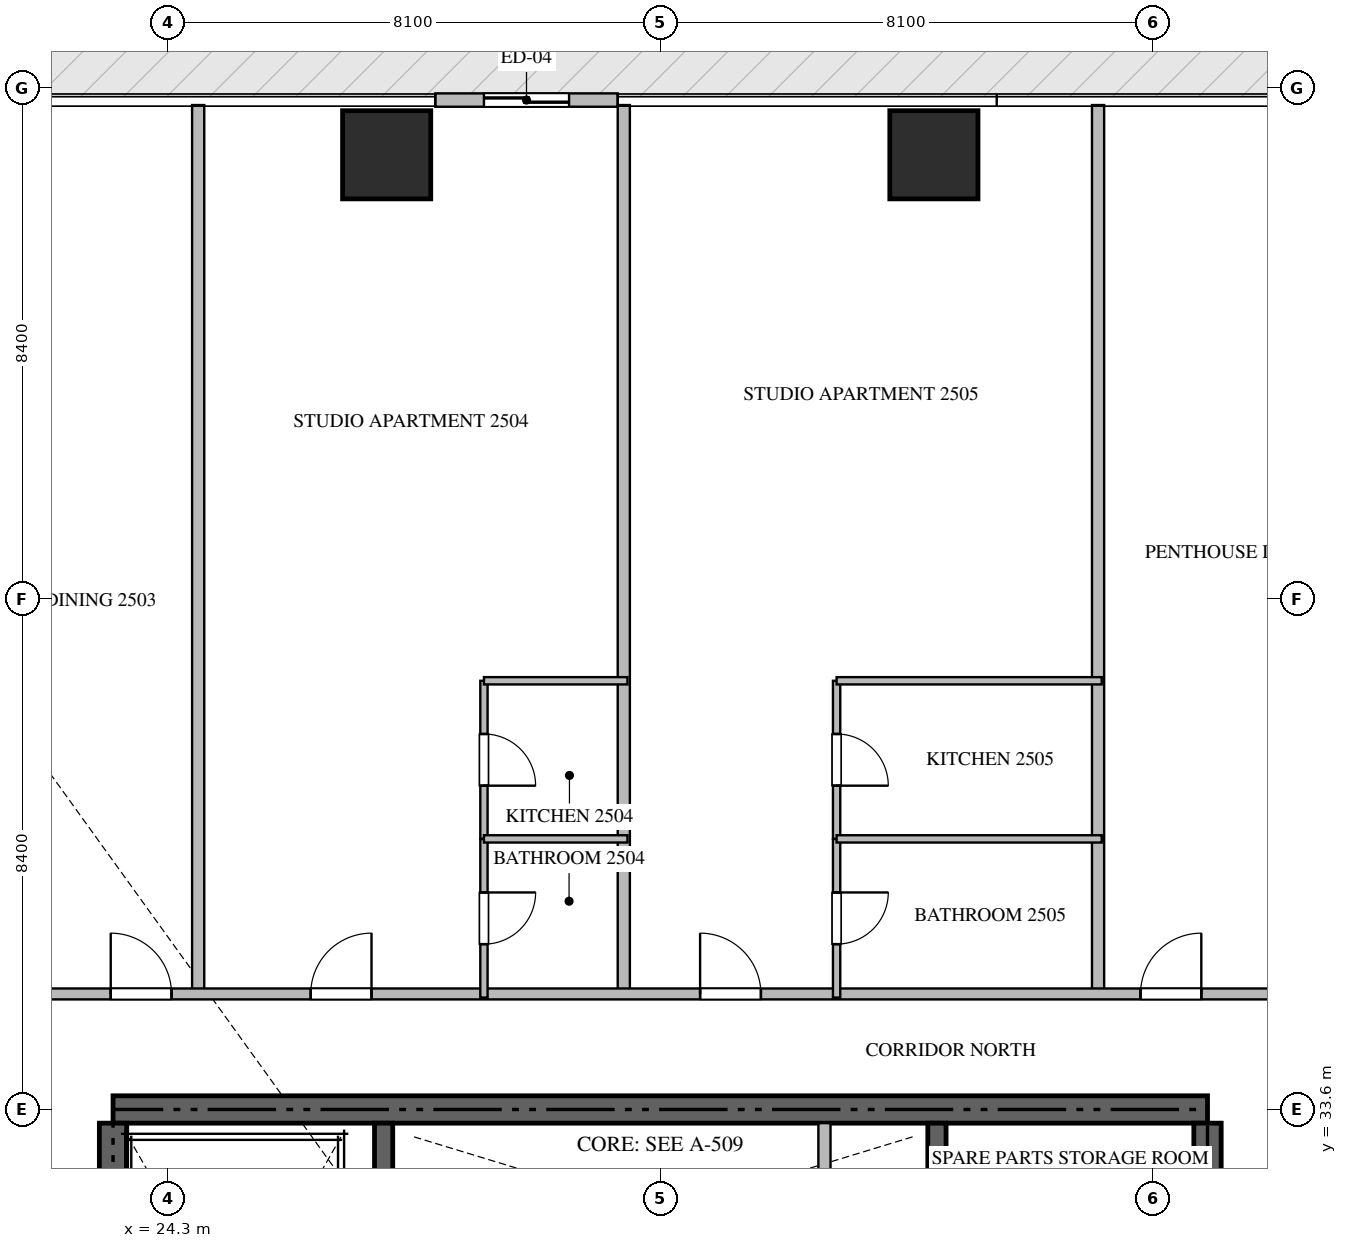
"""IFC4 building model, lengths in metres.
Left out: names, types, materials, properties, quantities, classifications, styles, units other than length and angle.
Written with IfcOpenShell. Run it as: python <this file> out.ifc"""

import sys

from ifc_helpers import new_model, si_unit, direction, frame, frame_2d, origin, origin_2d, place, context, subcontext, project, spatial, rectangle, extrude, source, transform, mapped, element, fill, save


model = new_model("IFC4")
c1 = context("Model", 3, precision=1e-05, world=origin(), true_north=direction((0.0, 1.0)))
c2 = subcontext(c1, "Body", "Model", "MODEL_VIEW")
j1 = project(units=[si_unit("LENGTHUNIT", "METRE"), si_unit("PLANEANGLEUNIT", "RADIAN")], contexts=[c1])
p1 = place(None, origin())
s1 = spatial("IfcSite", under=j1, at=p1, CompositionType="ELEMENT")
p2 = place(p1, origin())
s2 = spatial("IfcBuilding", under=s1, at=p2, CompositionType="ELEMENT")
p3 = place(p2, frame((0.0, 0.0, 101.7)))
s3 = spatial("IfcBuildingStorey", under=s2, at=p3, CompositionType="ELEMENT", Elevation=101.7)
p4 = place(p3, frame((41.4, 33.6, -0.26), z_axis=(0.0, 0.0, 1.0), x_axis=(-1.0, 0.0, 0.0)))
e1 = element("IfcWall", 1, at=p4, inside=s3, PredefinedType="SHEAR", context=c2, shape_type="SweptSolid", body=[
    extrude(rectangle(XDim=18.0, YDim=0.45, at=frame_2d((9.0, 0.0))), origin(), (0.0, 0.0, 1.0), 3.748),
])
p5 = place(p3, frame((23.4, 24.25, -0.26), z_axis=(0.0, 0.0, 1.0), x_axis=(0.0, 1.0, 0.0)))
e2 = element("IfcWall", 2, at=p5, inside=s3, PredefinedType="SHEAR", context=c2, shape_type="SweptSolid", body=[
    extrude(rectangle(XDim=9.125, YDim=0.45, at=frame_2d((4.562, 0.0))), origin(), (0.0, 0.0, 1.0), 3.748),
])
p6 = place(p3, frame((41.4, 27.75, -0.26), z_axis=(0.0, 0.0, 1.0), x_axis=(0.0, 1.0, 0.0)))
e3 = element("IfcWall", 3, at=p6, inside=s3, PredefinedType="SHEAR", context=c2, shape_type="SweptSolid", body=[
    extrude(rectangle(XDim=5.625, YDim=0.45, at=frame_2d((2.812, 0.0))), origin(), (0.0, 0.0, 1.0), 3.748),
])
p7 = place(p3, frame((27.85, 23.55, -0.26), z_axis=(0.0, 0.0, 1.0), x_axis=(0.0, 1.0, 0.0)))
e4 = element("IfcWall", 4, at=p7, inside=s3, PredefinedType="SHEAR", context=c2, shape_type="SweptSolid", body=[
    extrude(rectangle(XDim=9.825, YDim=0.3, at=frame_2d((4.913, 0.0))), origin(), (0.0, 0.0, 1.0), 3.748),
])
p8 = place(p3, frame((36.95, 27.05, -0.26), z_axis=(0.0, 0.0, 1.0), x_axis=(0.0, 1.0, 0.0)))
e5 = element("IfcWall", 5, at=p8, inside=s3, PredefinedType="SHEAR", context=c2, shape_type="SweptSolid", body=[
    extrude(rectangle(XDim=6.325, YDim=0.3, at=frame_2d((3.163, 0.0))), origin(), (0.0, 0.0, 1.0), 3.748),
])
m1 = source(origin(), c2, "Body", "SweptSolid", [
    extrude(rectangle(XDim=1.45, YDim=1.45, at=origin_2d()), origin(), (0.0, 0.0, 1.0), 3.75),
])
for number, where, z_axis, x_axis in (
    (6, (27.9, 49.3, -0.26), (0.0, 0.0, 1.0), (1.0, 0.0, 0.0)),
    (7, (36.9, 49.3, -0.26), (0.0, 0.0, 1.0), (1.0, 0.0, 0.0)),
):
    element("IfcColumn", number, at=place(p3, frame(where, z_axis=z_axis, x_axis=x_axis)), inside=s3, PredefinedType="COLUMN", context=c2, shape_type="MappedRepresentation", body=[
        mapped(m1, transform((0.0, 0.0, 0.0), scale=1.0)),
    ])
p9 = place(p3, frame((31.7, 50.2, 0.0), z_axis=(0.0, 0.0, 1.0), x_axis=(-1.0, 0.0, 0.0)))
e8 = element("IfcWall", 8, at=p9, inside=s3, PredefinedType="ELEMENTEDWALL", context=c2, shape_type="SweptSolid", body=[
    extrude(rectangle(XDim=3.0, YDim=0.22, at=frame_2d((1.5, 0.0))), origin(), (0.0, 0.0, 1.0), 3.475),
])
p10 = place(p9, frame((0.8, 0.0, 0.0)))
e9 = element("IfcOpeningElement", 9, at=p10, cuts=e8, PredefinedType="OPENING", context=c2, shape_type="SweptSolid", body=[
    extrude(rectangle(XDim=1.4, YDim=2.25, at=frame_2d((0.7, 1.125))), frame((0.0, 0.12, 0.0), z_axis=(0.0, -1.0, 0.0), x_axis=(1.0, 0.0, 0.0)), (0.0, 0.0, 1.0), 0.24),
])
p11 = place(p3, frame((35.1, 30.75, 0.0), z_axis=(0.0, 0.0, 1.0), x_axis=(0.0, 1.0, 0.0)))
e10 = element("IfcWall", 10, at=p11, inside=s3, PredefinedType="STANDARD", context=c2, shape_type="SweptSolid", body=[
    extrude(rectangle(XDim=2.625, YDim=0.2, at=frame_2d((1.312, 0.0))), origin(), (0.0, 0.0, 1.0), 3.49),
])
for number, where, z_axis, x_axis in (
    (11, (24.8, 35.5, 0.0), (0.0, 0.0, 1.0), (0.0, 1.0, 0.0)),
    (12, (31.8, 35.5, 0.0), (0.0, 0.0, 1.0), (0.0, 1.0, 0.0)),
    (13, (39.6, 35.5, 0.0), (0.0, 0.0, 1.0), (0.0, 1.0, 0.0)),
):
    element("IfcWall", number, at=place(p3, frame(where, z_axis=z_axis, x_axis=x_axis)), inside=s3, PredefinedType="PARTITIONING", context=c2, shape_type="SweptSolid", body=[
        extrude(rectangle(XDim=14.618, YDim=0.2, at=frame_2d((7.309, 0.0))), origin(), (0.0, 0.0, 1.0), 3.49),
    ])
p12 = place(p3, frame((21.402, 35.5, 0.0), z_axis=(0.0, 0.0, 1.0), x_axis=(1.0, 0.0, 0.0)))
e14 = element("IfcWall", 14, at=p12, inside=s3, PredefinedType="PARTITIONING", context=c2, shape_type="SweptSolid", body=[
    extrude(rectangle(XDim=21.996, YDim=0.18, at=frame_2d((10.998, 0.0))), origin(), (0.0, 0.0, 1.0), 3.49),
])
p13 = place(p12, frame((1.96, 0.0, 0.0)))
e15 = element("IfcOpeningElement", 15, at=p13, cuts=e14, PredefinedType="OPENING", context=c2, shape_type="SweptSolid", body=[
    extrude(rectangle(XDim=1.0, YDim=2.15, at=frame_2d((0.5, 1.075))), frame((0.0, 0.1, 0.0), z_axis=(0.0, -1.0, 0.0), x_axis=(1.0, 0.0, 0.0)), (0.0, 0.0, 1.0), 0.2),
])
p14 = place(p12, frame((5.249, 0.0, 0.0)))
e16 = element("IfcOpeningElement", 16, at=p14, cuts=e14, PredefinedType="OPENING", context=c2, shape_type="SweptSolid", body=[
    extrude(rectangle(XDim=1.0, YDim=2.15, at=frame_2d((0.5, 1.075))), frame((0.0, 0.1, 0.0), z_axis=(0.0, -1.0, 0.0), x_axis=(1.0, 0.0, 0.0)), (0.0, 0.0, 1.0), 0.2),
])
p15 = place(p12, frame((11.653, 0.0, 0.0)))
e17 = element("IfcOpeningElement", 17, at=p15, cuts=e14, PredefinedType="OPENING", context=c2, shape_type="SweptSolid", body=[
    extrude(rectangle(XDim=1.0, YDim=2.15, at=frame_2d((0.5, 1.075))), frame((0.0, 0.1, 0.0), z_axis=(0.0, -1.0, 0.0), x_axis=(1.0, 0.0, 0.0)), (0.0, 0.0, 1.0), 0.2),
])
p16 = place(p12, frame((18.896, 0.0, 0.0)))
e18 = element("IfcOpeningElement", 18, at=p16, cuts=e14, PredefinedType="OPENING", context=c2, shape_type="SweptSolid", body=[
    extrude(rectangle(XDim=1.0, YDim=2.15, at=frame_2d((0.5, 1.075))), frame((0.0, 0.1, 0.0), z_axis=(0.0, -1.0, 0.0), x_axis=(1.0, 0.0, 0.0)), (0.0, 0.0, 1.0), 0.2),
])
p17 = place(p3, frame((29.5, 40.65, 0.0), z_axis=(0.0, 0.0, 1.0), x_axis=(0.0, -1.0, 0.0)))
e19 = element("IfcWall", 19, at=p17, inside=s3, PredefinedType="PARTITIONING", context=c2, shape_type="SweptSolid", body=[
    extrude(rectangle(XDim=2.6, YDim=0.12, at=frame_2d((1.3, 0.0))), origin(), (0.0, 0.0, 1.0), 3.49),
])
p18 = place(p17, frame((0.875, 0.0, 0.0)))
e20 = element("IfcOpeningElement", 20, at=p18, cuts=e19, PredefinedType="OPENING", context=c2, shape_type="SweptSolid", body=[
    extrude(rectangle(XDim=0.85, YDim=2.1, at=frame_2d((0.425, 1.05))), frame((0.0, 0.07, 0.0), z_axis=(0.0, -1.0, 0.0), x_axis=(1.0, 0.0, 0.0)), (0.0, 0.0, 1.0), 0.14),
])
p19 = place(p3, frame((29.5, 38.048, 0.0), z_axis=(0.0, 0.0, 1.0), x_axis=(0.0, -1.0, 0.0)))
e21 = element("IfcWall", 21, at=p19, inside=s3, PredefinedType="PARTITIONING", context=c2, shape_type="SweptSolid", body=[
    extrude(rectangle(XDim=2.608, YDim=0.12, at=frame_2d((1.304, 0.0))), origin(), (0.0, 0.0, 1.0), 3.49),
])
p20 = place(p19, frame((0.879, 0.0, 0.0)))
e22 = element("IfcOpeningElement", 22, at=p20, cuts=e21, PredefinedType="OPENING", context=c2, shape_type="SweptSolid", body=[
    extrude(rectangle(XDim=0.85, YDim=2.1, at=frame_2d((0.425, 1.05))), frame((0.0, 0.07, 0.0), z_axis=(0.0, -1.0, 0.0), x_axis=(1.0, 0.0, 0.0)), (0.0, 0.0, 1.0), 0.14),
])
for number, where, z_axis, x_axis in (
    (23, (29.5, 38.05, 0.0), (0.0, 0.0, 1.0), (1.0, 0.0, 0.0)),
    (24, (29.5, 40.65, 0.0), (0.0, 0.0, 1.0), (1.0, 0.0, 0.0)),
):
    element("IfcWall", number, at=place(p3, frame(where, z_axis=z_axis, x_axis=x_axis)), inside=s3, PredefinedType="PARTITIONING", context=c2, shape_type="SweptSolid", body=[
        extrude(rectangle(XDim=2.36, YDim=0.12, at=frame_2d((1.18, 0.0))), origin(), (0.0, 0.0, 1.0), 3.49),
    ])
p21 = place(p3, frame((35.3, 40.65, 0.0), z_axis=(0.0, 0.0, 1.0), x_axis=(0.0, -1.0, 0.0)))
e25 = element("IfcWall", 25, at=p21, inside=s3, PredefinedType="PARTITIONING", context=c2, shape_type="SweptSolid", body=[
    extrude(rectangle(XDim=2.6, YDim=0.12, at=frame_2d((1.3, 0.0))), origin(), (0.0, 0.0, 1.0), 3.49),
])
p22 = place(p21, frame((0.875, 0.0, 0.0)))
e26 = element("IfcOpeningElement", 26, at=p22, cuts=e25, PredefinedType="OPENING", context=c2, shape_type="SweptSolid", body=[
    extrude(rectangle(XDim=0.85, YDim=2.1, at=frame_2d((0.425, 1.05))), frame((0.0, 0.07, 0.0), z_axis=(0.0, -1.0, 0.0), x_axis=(1.0, 0.0, 0.0)), (0.0, 0.0, 1.0), 0.14),
])
p23 = place(p3, frame((35.3, 38.048, 0.0), z_axis=(0.0, 0.0, 1.0), x_axis=(0.0, -1.0, 0.0)))
e27 = element("IfcWall", 27, at=p23, inside=s3, PredefinedType="PARTITIONING", context=c2, shape_type="SweptSolid", body=[
    extrude(rectangle(XDim=2.608, YDim=0.12, at=frame_2d((1.304, 0.0))), origin(), (0.0, 0.0, 1.0), 3.49),
])
p24 = place(p23, frame((0.879, 0.0, 0.0)))
e28 = element("IfcOpeningElement", 28, at=p24, cuts=e27, PredefinedType="OPENING", context=c2, shape_type="SweptSolid", body=[
    extrude(rectangle(XDim=0.85, YDim=2.1, at=frame_2d((0.425, 1.05))), frame((0.0, 0.07, 0.0), z_axis=(0.0, -1.0, 0.0), x_axis=(1.0, 0.0, 0.0)), (0.0, 0.0, 1.0), 0.14),
])
for number, where, z_axis, x_axis in (
    (29, (35.3, 38.05, 0.0), (0.0, 0.0, 1.0), (1.0, 0.0, 0.0)),
    (30, (35.3, 40.65, 0.0), (0.0, 0.0, 1.0), (1.0, 0.0, 0.0)),
):
    element("IfcWall", number, at=place(p3, frame(where, z_axis=z_axis, x_axis=x_axis)), inside=s3, PredefinedType="PARTITIONING", context=c2, shape_type="SweptSolid", body=[
        extrude(rectangle(XDim=4.36, YDim=0.12, at=frame_2d((2.18, 0.0))), origin(), (0.0, 0.0, 1.0), 3.49),
    ])
m2 = source(origin(), c2, "Body", "SweptSolid", [
    extrude(rectangle(XDim=1.4, YDim=2.25, at=frame_2d((0.7, 1.125))), frame((0.0, 0.025, 0.0), z_axis=(0.0, -1.0, 0.0), x_axis=(1.0, 0.0, 0.0)), (0.0, 0.0, 1.0), 0.05),
])
p25 = place(p10, origin())
e31 = element("IfcDoor", 31, at=p25, inside=s3, OperationType="SLIDING_TO_LEFT", PredefinedType="DOOR", context=c2, shape_type="MappedRepresentation", body=[
    mapped(m2, transform((0.0, 0.0, 0.0), scale=1.0)),
])
fill(e9, e31)
m3 = source(origin(), c2, "Body", "SweptSolid", [
    extrude(rectangle(XDim=1.0, YDim=2.15, at=frame_2d((0.5, 1.075))), frame((0.0, 0.025, 0.0), z_axis=(0.0, -1.0, 0.0), x_axis=(1.0, 0.0, 0.0)), (0.0, 0.0, 1.0), 0.05),
])
p26 = place(p13, origin())
e32 = element("IfcDoor", 32, at=p26, inside=s3, OperationType="SINGLE_SWING_LEFT", PredefinedType="DOOR", context=c2, shape_type="MappedRepresentation", body=[
    mapped(m3, transform((0.0, 0.0, 0.0), scale=1.0)),
])
fill(e15, e32)
p27 = place(p14, origin())
e33 = element("IfcDoor", 33, at=p27, inside=s3, OperationType="SINGLE_SWING_RIGHT", PredefinedType="DOOR", context=c2, shape_type="MappedRepresentation", body=[
    mapped(m3, transform((0.0, 0.0, 0.0), scale=1.0)),
])
fill(e16, e33)
p28 = place(p15, origin())
e34 = element("IfcDoor", 34, at=p28, inside=s3, OperationType="SINGLE_SWING_LEFT", PredefinedType="DOOR", context=c2, shape_type="MappedRepresentation", body=[
    mapped(m3, transform((0.0, 0.0, 0.0), scale=1.0)),
])
fill(e17, e34)
p29 = place(p16, origin())
e35 = element("IfcDoor", 35, at=p29, inside=s3, OperationType="SINGLE_SWING_RIGHT", PredefinedType="DOOR", context=c2, shape_type="MappedRepresentation", body=[
    mapped(m3, transform((0.0, 0.0, 0.0), scale=1.0)),
])
fill(e18, e35)
m4 = source(origin(), c2, "Body", "SweptSolid", [
    extrude(rectangle(XDim=0.85, YDim=2.1, at=frame_2d((0.425, 1.05))), frame((0.0, 0.025, 0.0), z_axis=(0.0, -1.0, 0.0), x_axis=(1.0, 0.0, 0.0)), (0.0, 0.0, 1.0), 0.05),
])
p30 = place(p18, origin())
e36 = element("IfcDoor", 36, at=p30, inside=s3, OperationType="SINGLE_SWING_RIGHT", PredefinedType="DOOR", context=c2, shape_type="MappedRepresentation", body=[
    mapped(m4, transform((0.0, 0.0, 0.0), scale=1.0)),
])
fill(e20, e36)
p31 = place(p20, origin())
e37 = element("IfcDoor", 37, at=p31, inside=s3, OperationType="SINGLE_SWING_LEFT", PredefinedType="DOOR", context=c2, shape_type="MappedRepresentation", body=[
    mapped(m4, transform((0.0, 0.0, 0.0), scale=1.0)),
])
fill(e22, e37)
p32 = place(p22, origin())
e38 = element("IfcDoor", 38, at=p32, inside=s3, OperationType="SINGLE_SWING_RIGHT", PredefinedType="DOOR", context=c2, shape_type="MappedRepresentation", body=[
    mapped(m4, transform((0.0, 0.0, 0.0), scale=1.0)),
])
fill(e26, e38)
p33 = place(p24, origin())
e39 = element("IfcDoor", 39, at=p33, inside=s3, OperationType="SINGLE_SWING_LEFT", PredefinedType="DOOR", context=c2, shape_type="MappedRepresentation", body=[
    mapped(m4, transform((0.0, 0.0, 0.0), scale=1.0)),
])
fill(e28, e39)
save(model, sys.argv[1])
